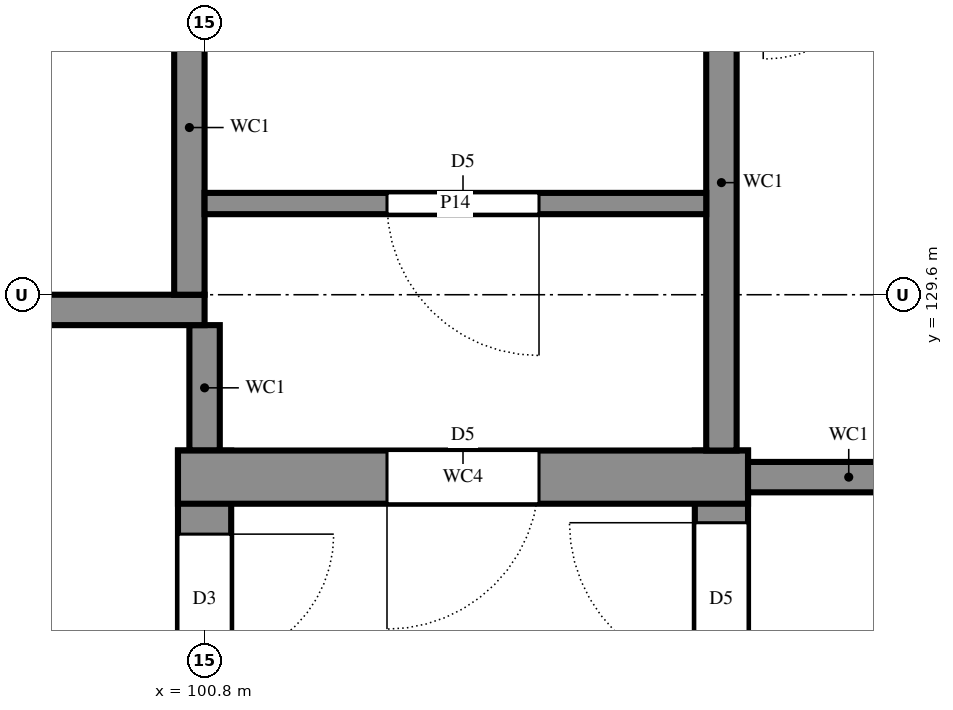
"""IFC4 building model, lengths in metres.
Left out: names, types, materials, properties, quantities, classifications, styles, units other than length and angle.
Written with IfcOpenShell. Run it as: python <this file> out.ifc"""

import sys

from ifc_helpers import new_model, si_unit, direction, frame, frame_2d, origin, place, context, subcontext, project, spatial, rectangle, extrude, element, fill, save


model = new_model("IFC4")
c1 = context("Model", 3, precision=1e-05, world=origin(), true_north=direction((0.0, 1.0)))
c2 = subcontext(c1, "Body", "Model", "MODEL_VIEW")
j1 = project(units=[si_unit("LENGTHUNIT", "METRE"), si_unit("PLANEANGLEUNIT", "RADIAN")], contexts=[c1])
p1 = place(None, origin())
s1 = spatial("IfcSite", under=j1, at=p1, CompositionType="ELEMENT")
p2 = place(p1, origin())
s2 = spatial("IfcBuilding", under=s1, at=p2, CompositionType="ELEMENT")
p3 = place(p2, origin())
s3 = spatial("IfcBuildingStorey", under=s2, at=p3, CompositionType="ELEMENT", Elevation=0.0)
p4 = place(p3, frame((104.2, 125.1, 0.0), z_axis=(0.0, 0.0, 1.0), x_axis=(0.0, 1.0, 0.0)))
e1 = element("IfcWall", 1, at=p4, inside=s3, PredefinedType="SHEAR", context=c2, shape_type="SweptSolid", body=[
    extrude(rectangle(XDim=3.475, YDim=0.35, at=frame_2d((1.737, 0.0))), origin(), (0.0, 0.0, 1.0), 3.6),
])
p5 = place(p4, frame((2.0, 0.0, 0.0)))
e2 = element("IfcOpeningElement", 2, at=p5, cuts=e1, PredefinedType="OPENING", context=c2, shape_type="SweptSolid", body=[
    extrude(rectangle(XDim=1.0, YDim=2.1, at=frame_2d((0.5, 1.05))), frame((0.0, 0.185, 0.0), z_axis=(0.0, -1.0, 0.0), x_axis=(1.0, 0.0, 0.0)), (0.0, 0.0, 1.0), 0.37),
])
p6 = place(p3, frame((100.8, 128.575, 0.0), z_axis=(0.0, 0.0, 1.0), x_axis=(0.0, -1.0, 0.0)))
e3 = element("IfcWall", 3, at=p6, inside=s3, PredefinedType="SHEAR", context=c2, shape_type="SweptSolid", body=[
    extrude(rectangle(XDim=6.35, YDim=0.35, at=frame_2d((3.175, 0.0))), origin(), (0.0, 0.0, 1.0), 3.6),
])
p7 = place(p6, frame((0.55, 0.0, 0.0)))
e4 = element("IfcOpeningElement", 4, at=p7, cuts=e3, PredefinedType="OPENING", context=c2, shape_type="SweptSolid", body=[
    extrude(rectangle(XDim=0.85, YDim=2.1, at=frame_2d((0.425, 1.05))), frame((0.0, 0.185, 0.0), z_axis=(0.0, -1.0, 0.0), x_axis=(1.0, 0.0, 0.0)), (0.0, 0.0, 1.0), 0.37),
])
p8 = place(p3, frame((100.8, 128.575, 0.0), z_axis=(0.0, 0.0, 1.0), x_axis=(0.0, 1.0, 0.0)))
e5 = element("IfcWall", 5, at=p8, inside=s3, PredefinedType="SHEAR", context=c2, shape_type="SweptSolid", body=[
    extrude(rectangle(XDim=0.825, YDim=0.2, at=frame_2d((0.413, 0.0))), origin(), (0.0, 0.0, 1.0), 3.6),
])
p9 = place(p3, frame((104.375, 128.4, 0.0), z_axis=(0.0, 0.0, 1.0), x_axis=(-1.0, 0.0, 0.0)))
e6 = element("IfcWall", 6, at=p9, inside=s3, PredefinedType="SHEAR", context=c2, shape_type="SweptSolid", body=[
    extrude(rectangle(XDim=3.75, YDim=0.35, at=frame_2d((1.875, 0.0))), origin(), (0.0, 0.0, 1.0), 3.6),
])
p10 = place(p9, frame((1.375, 0.0, 0.0)))
e7 = element("IfcOpeningElement", 7, at=p10, cuts=e6, PredefinedType="OPENING", context=c2, shape_type="SweptSolid", body=[
    extrude(rectangle(XDim=1.0, YDim=2.1, at=frame_2d((0.5, 1.05))), frame((0.0, 0.185, 0.0), z_axis=(0.0, -1.0, 0.0), x_axis=(1.0, 0.0, 0.0)), (0.0, 0.0, 1.0), 0.37),
])
p11 = place(p3, frame((104.375, 128.4, 0.0), z_axis=(0.0, 0.0, 1.0), x_axis=(1.0, 0.0, 0.0)))
e8 = element("IfcWall", 8, at=p11, inside=s3, PredefinedType="SHEAR", context=c2, shape_type="SweptSolid", body=[
    extrude(rectangle(XDim=1.325, YDim=0.2, at=frame_2d((0.663, 0.0))), origin(), (0.0, 0.0, 1.0), 3.6),
])
p12 = place(p3, frame((104.2, 132.1, 0.0), z_axis=(0.0, 0.0, 1.0), x_axis=(0.0, -1.0, 0.0)))
e9 = element("IfcWall", 9, at=p12, inside=s3, PredefinedType="SHEAR", context=c2, shape_type="SweptSolid", body=[
    extrude(rectangle(XDim=3.525, YDim=0.2, at=frame_2d((1.763, 0.0))), origin(), (0.0, 0.0, 1.0), 3.6),
])
p13 = place(p3, frame((98.4, 129.5, 0.0), z_axis=(0.0, 0.0, 1.0), x_axis=(1.0, 0.0, 0.0)))
e10 = element("IfcWall", 10, at=p13, inside=s3, PredefinedType="SHEAR", context=c2, shape_type="SweptSolid", body=[
    extrude(rectangle(XDim=2.4, YDim=0.2, at=frame_2d((1.2, 0.0))), origin(), (0.0, 0.0, 1.0), 3.6),
])
p14 = place(p3, frame((100.7, 129.6, 0.0), z_axis=(0.0, 0.0, 1.0), x_axis=(0.0, 1.0, 0.0)))
e11 = element("IfcWall", 11, at=p14, inside=s3, PredefinedType="SHEAR", context=c2, shape_type="SweptSolid", body=[
    extrude(rectangle(XDim=2.2, YDim=0.2, at=frame_2d((1.1, 0.0))), origin(), (0.0, 0.0, 1.0), 3.6),
])
p15 = place(p3, frame((100.8, 130.2, 0.0), z_axis=(0.0, 0.0, 1.0), x_axis=(1.0, 0.0, 0.0)))
e12 = element("IfcWall", 12, at=p15, inside=s3, PredefinedType="PARTITIONING", context=c2, shape_type="SweptSolid", body=[
    extrude(rectangle(XDim=3.3, YDim=0.14, at=frame_2d((1.65, 0.0))), origin(), (0.0, 0.0, 1.0), 3.42),
])
p16 = place(p15, frame((1.2, 0.0, 0.0)))
e13 = element("IfcOpeningElement", 13, at=p16, cuts=e12, PredefinedType="OPENING", context=c2, shape_type="SweptSolid", body=[
    extrude(rectangle(XDim=1.0, YDim=2.1, at=frame_2d((0.5, 1.05))), frame((0.0, 0.08, 0.0), z_axis=(0.0, -1.0, 0.0), x_axis=(1.0, 0.0, 0.0)), (0.0, 0.0, 1.0), 0.16),
])
p17 = place(p16, frame((1.0, 0.0, 0.0), z_axis=(0.0, 0.0, 1.0), x_axis=(-1.0, 0.0, 0.0)))
e14 = element("IfcDoor", 14, at=p17, inside=s3, OperationType="SINGLE_SWING_RIGHT", PredefinedType="DOOR", context=c2, shape_type="SweptSolid", body=[
    extrude(rectangle(XDim=1.0, YDim=2.1, at=frame_2d((0.5, 1.05))), frame((0.0, 0.025, 0.0), z_axis=(0.0, -1.0, 0.0), x_axis=(1.0, 0.0, 0.0)), (0.0, 0.0, 1.0), 0.05),
])
fill(e13, e14)
p18 = place(p10, origin())
e15 = element("IfcDoor", 15, at=p18, inside=s3, OperationType="SINGLE_SWING_LEFT", PredefinedType="DOOR", context=c2, shape_type="SweptSolid", body=[
    extrude(rectangle(XDim=1.0, YDim=2.1, at=frame_2d((0.5, 1.05))), frame((0.0, 0.025, 0.0), z_axis=(0.0, -1.0, 0.0), x_axis=(1.0, 0.0, 0.0)), (0.0, 0.0, 1.0), 0.05),
])
fill(e7, e15)
p19 = place(p7, origin())
e16 = element("IfcDoor", 16, at=p19, inside=s3, OperationType="SINGLE_SWING_RIGHT", PredefinedType="DOOR", context=c2, shape_type="SweptSolid", body=[
    extrude(rectangle(XDim=0.85, YDim=2.1, at=frame_2d((0.425, 1.05))), frame((0.0, 0.025, 0.0), z_axis=(0.0, -1.0, 0.0), x_axis=(1.0, 0.0, 0.0)), (0.0, 0.0, 1.0), 0.05),
])
fill(e4, e16)
p20 = place(p5, origin())
e17 = element("IfcDoor", 17, at=p20, inside=s3, OperationType="SINGLE_SWING_LEFT", PredefinedType="DOOR", context=c2, shape_type="SweptSolid", body=[
    extrude(rectangle(XDim=1.0, YDim=2.1, at=frame_2d((0.5, 1.05))), frame((0.0, 0.025, 0.0), z_axis=(0.0, -1.0, 0.0), x_axis=(1.0, 0.0, 0.0)), (0.0, 0.0, 1.0), 0.05),
])
fill(e2, e17)
save(model, sys.argv[1])
